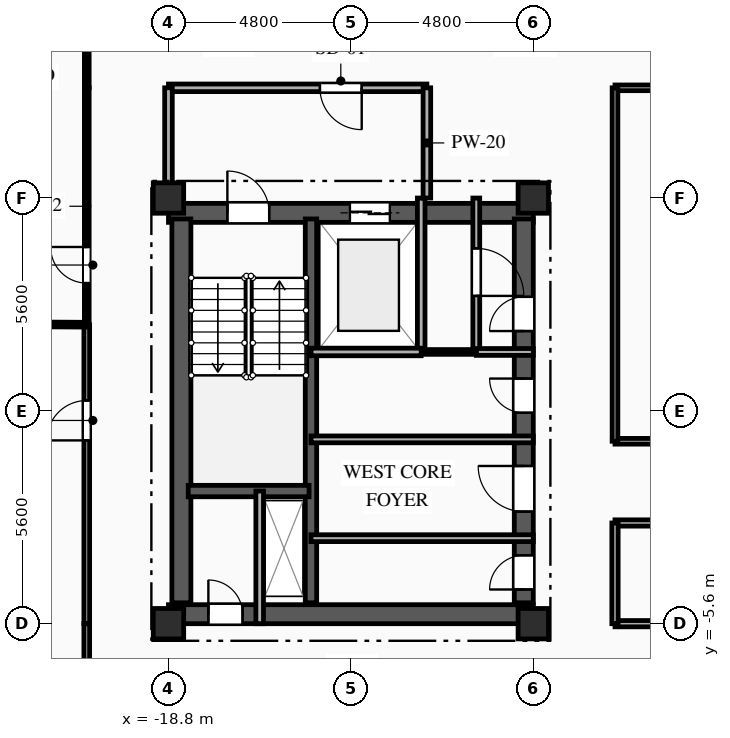
"""IFC4 building model, lengths in metres.
Left out: names, types, materials, properties, quantities, classifications, styles, units other than length and angle.
Written with IfcOpenShell. Run it as: python <this file> out.ifc"""

import sys

from ifc_helpers import new_model, si_unit, direction, frame, frame_2d, origin, origin_2d, place, context, subcontext, project, spatial, rectangle, extrude, element, fill, save


model = new_model("IFC4")
c1 = context("Model", 3, precision=1e-05, world=origin(), true_north=direction((0.0, 1.0)))
c2 = subcontext(c1, "Body", "Model", "MODEL_VIEW")
j1 = project(units=[si_unit("LENGTHUNIT", "METRE"), si_unit("PLANEANGLEUNIT", "RADIAN")], contexts=[c1])
p1 = place(None, origin())
s1 = spatial("IfcSite", under=j1, at=p1, CompositionType="ELEMENT")
p2 = place(p1, origin())
s2 = spatial("IfcBuilding", under=s1, at=p2, CompositionType="ELEMENT")
p3 = place(p2, frame((0.0, 0.0, 196.4)))
s3 = spatial("IfcBuildingStorey", under=s2, at=p3, CompositionType="ELEMENT", Elevation=196.4)
for number, where, z_axis, x_axis in (
    (1, (-18.8, -5.6, 0.0), (0.0, 0.0, 1.0), (1.0, 0.0, 0.0)),
    (2, (-18.8, 5.6, 0.0), (0.0, 0.0, 1.0), (1.0, 0.0, 0.0)),
    (3, (-9.2, -5.6, 0.0), (0.0, 0.0, 1.0), (1.0, 0.0, 0.0)),
    (4, (-9.2, 5.6, 0.0), (0.0, 0.0, 1.0), (1.0, 0.0, 0.0)),
):
    element("IfcColumn", number, at=place(p3, frame(where, z_axis=z_axis, x_axis=x_axis)), inside=s3, PredefinedType="COLUMN", context=c2, shape_type="SweptSolid", body=[
        extrude(rectangle(XDim=0.8, YDim=0.8, at=origin_2d()), origin(), (0.0, 0.0, 1.0), 3.35),
    ])
p4 = place(p3, frame((-18.8, 5.21, 0.0), z_axis=(0.0, 0.0, 1.0), x_axis=(1.0, 0.0, 0.0)))
e5 = element("IfcWall", 5, at=p4, inside=s3, PredefinedType="SHEAR", context=c2, shape_type="SweptSolid", body=[
    extrude(rectangle(XDim=9.6, YDim=0.5, at=frame_2d((4.8, 0.0))), origin(), (0.0, 0.0, 1.0), 3.04),
])
p5 = place(p4, frame((1.55, 0.0, 0.0)))
e6 = element("IfcOpeningElement", 6, at=p5, cuts=e5, PredefinedType="OPENING", context=c2, shape_type="SweptSolid", body=[
    extrude(rectangle(XDim=1.1, YDim=2.15, at=frame_2d((0.55, 1.075))), frame((0.0, 0.26, 0.0), z_axis=(0.0, -1.0, 0.0), x_axis=(1.0, 0.0, 0.0)), (0.0, 0.0, 1.0), 0.52),
])
p6 = place(p4, frame((4.775, 0.0, 0.0)))
e7 = element("IfcOpeningElement", 7, at=p6, cuts=e5, PredefinedType="OPENING", context=c2, shape_type="SweptSolid", body=[
    extrude(rectangle(XDim=1.05, YDim=2.1, at=frame_2d((0.525, 1.05))), frame((0.0, 0.26, 0.0), z_axis=(0.0, -1.0, 0.0), x_axis=(1.0, 0.0, 0.0)), (0.0, 0.0, 1.0), 0.52),
])
p7 = place(p3, frame((-18.8, -5.35, 0.0), z_axis=(0.0, 0.0, 1.0), x_axis=(1.0, 0.0, 0.0)))
e8 = element("IfcWall", 8, at=p7, inside=s3, PredefinedType="SHEAR", context=c2, shape_type="SweptSolid", body=[
    extrude(rectangle(XDim=9.6, YDim=0.5, at=frame_2d((4.8, 0.0))), origin(), (0.0, 0.0, 1.0), 3.04),
])
p8 = place(p7, frame((1.05, 0.0, 0.0)))
e9 = element("IfcOpeningElement", 9, at=p8, cuts=e8, PredefinedType="OPENING", context=c2, shape_type="SweptSolid", body=[
    extrude(rectangle(XDim=0.9, YDim=2.1, at=frame_2d((0.45, 1.05))), frame((0.0, 0.26, 0.0), z_axis=(0.0, -1.0, 0.0), x_axis=(1.0, 0.0, 0.0)), (0.0, 0.0, 1.0), 0.52),
])
p9 = place(p3, frame((-18.46, -5.05, 0.0), z_axis=(0.0, 0.0, 1.0), x_axis=(0.0, 1.0, 0.0)))
e10 = element("IfcWall", 10, at=p9, inside=s3, PredefinedType="SHEAR", context=c2, shape_type="SweptSolid", body=[
    extrude(rectangle(XDim=10.1, YDim=0.5, at=frame_2d((5.05, 0.0))), origin(), (0.0, 0.0, 1.0), 3.04),
])
p10 = place(p3, frame((-9.45, -5.05, 0.0), z_axis=(0.0, 0.0, 1.0), x_axis=(0.0, 1.0, 0.0)))
e11 = element("IfcWall", 11, at=p10, inside=s3, PredefinedType="SHEAR", context=c2, shape_type="SweptSolid", body=[
    extrude(rectangle(XDim=10.1, YDim=0.5, at=frame_2d((5.05, 0.0))), origin(), (0.0, 0.0, 1.0), 3.04),
])
p11 = place(p10, frame((7.15, 0.0, 0.0)))
e12 = element("IfcOpeningElement", 12, at=p11, cuts=e11, PredefinedType="OPENING", context=c2, shape_type="SweptSolid", body=[
    extrude(rectangle(XDim=0.9, YDim=2.1, at=frame_2d((0.45, 1.05))), frame((0.0, 0.26, 0.0), z_axis=(0.0, -1.0, 0.0), x_axis=(1.0, 0.0, 0.0)), (0.0, 0.0, 1.0), 0.52),
])
p12 = place(p10, frame((2.4, 0.0, 0.0)))
e13 = element("IfcOpeningElement", 13, at=p12, cuts=e11, PredefinedType="OPENING", context=c2, shape_type="SweptSolid", body=[
    extrude(rectangle(XDim=1.2, YDim=2.15, at=frame_2d((0.6, 1.075))), frame((0.0, 0.26, 0.0), z_axis=(0.0, -1.0, 0.0), x_axis=(1.0, 0.0, 0.0)), (0.0, 0.0, 1.0), 0.52),
])
p13 = place(p10, frame((0.35, 0.0, 0.0)))
e14 = element("IfcOpeningElement", 14, at=p13, cuts=e11, PredefinedType="OPENING", context=c2, shape_type="SweptSolid", body=[
    extrude(rectangle(XDim=0.9, YDim=2.1, at=frame_2d((0.45, 1.05))), frame((0.0, 0.26, 0.0), z_axis=(0.0, -1.0, 0.0), x_axis=(1.0, 0.0, 0.0)), (0.0, 0.0, 1.0), 0.52),
])
p14 = place(p10, frame((5.0, 0.0, 0.0)))
e15 = element("IfcOpeningElement", 15, at=p14, cuts=e11, PredefinedType="OPENING", context=c2, shape_type="SweptSolid", body=[
    extrude(rectangle(XDim=0.9, YDim=2.1, at=frame_2d((0.45, 1.05))), frame((0.0, 0.26, 0.0), z_axis=(0.0, -1.0, 0.0), x_axis=(1.0, 0.0, 0.0)), (0.0, 0.0, 1.0), 0.52),
])
p15 = place(p3, frame((-15.05, -5.05, 0.0), z_axis=(0.0, 0.0, 1.0), x_axis=(0.0, 1.0, 0.0)))
e16 = element("IfcWall", 16, at=p15, inside=s3, PredefinedType="SHEAR", context=c2, shape_type="SweptSolid", body=[
    extrude(rectangle(XDim=10.1, YDim=0.3, at=frame_2d((5.05, 0.0))), origin(), (0.0, 0.0, 1.0), 3.04),
])
p16 = place(p3, frame((-18.28, -2.11, 0.0), z_axis=(0.0, 0.0, 1.0), x_axis=(1.0, 0.0, 0.0)))
e17 = element("IfcWall", 17, at=p16, inside=s3, PredefinedType="SHEAR", context=c2, shape_type="SweptSolid", body=[
    extrude(rectangle(XDim=3.18, YDim=0.3, at=frame_2d((1.59, 0.0))), origin(), (0.0, 0.0, 1.0), 3.04),
])
p17 = place(p3, frame((-16.4, -5.6, 0.0), z_axis=(0.0, 0.0, 1.0), x_axis=(0.0, 1.0, 0.0)))
e18 = element("IfcWall", 18, at=p17, inside=s3, PredefinedType="PARTITIONING", context=c2, shape_type="SweptSolid", body=[
    extrude(rectangle(XDim=3.49, YDim=0.2, at=frame_2d((1.745, 0.0))), origin(), (0.0, 0.0, 1.0), 3.04),
])
p18 = place(p3, frame((-12.15, 1.55, 0.0), z_axis=(0.0, 0.0, 1.0), x_axis=(0.0, 1.0, 0.0)))
e19 = element("IfcWall", 19, at=p18, inside=s3, PredefinedType="PARTITIONING", context=c2, shape_type="SweptSolid", body=[
    extrude(rectangle(XDim=4.05, YDim=0.2, at=frame_2d((2.025, 0.0))), origin(), (0.0, 0.0, 1.0), 3.04),
])
p19 = place(p3, frame((-12.0, 8.5, 0.0), z_axis=(0.0, 0.0, 1.0), x_axis=(-1.0, 0.0, 0.0)))
e20 = element("IfcWall", 20, at=p19, inside=s3, PredefinedType="PARTITIONING", context=c2, shape_type="SweptSolid", body=[
    extrude(rectangle(XDim=6.8, YDim=0.2, at=frame_2d((3.4, 0.0))), origin(), (0.0, 0.0, 1.0), 3.04),
])
p20 = place(p19, frame((1.715, 0.0, 0.0)))
e21 = element("IfcOpeningElement", 21, at=p20, cuts=e20, PredefinedType="OPENING", context=c2, shape_type="SweptSolid", body=[
    extrude(rectangle(XDim=1.1, YDim=2.15, at=frame_2d((0.55, 1.075))), frame((0.0, 0.11, 0.0), z_axis=(0.0, -1.0, 0.0), x_axis=(1.0, 0.0, 0.0)), (0.0, 0.0, 1.0), 0.22),
])
p21 = place(p3, frame((-18.8, 8.5, 0.0), z_axis=(0.0, 0.0, 1.0), x_axis=(0.0, -1.0, 0.0)))
e22 = element("IfcWall", 22, at=p21, inside=s3, PredefinedType="PARTITIONING", context=c2, shape_type="SweptSolid", body=[
    extrude(rectangle(XDim=2.9, YDim=0.2, at=frame_2d((1.45, 0.0))), origin(), (0.0, 0.0, 1.0), 2.665),
])
p22 = place(p3, frame((-12.0, 5.6, 0.0), z_axis=(0.0, 0.0, 1.0), x_axis=(0.0, 1.0, 0.0)))
e23 = element("IfcWall", 23, at=p22, inside=s3, PredefinedType="PARTITIONING", context=c2, shape_type="SweptSolid", body=[
    extrude(rectangle(XDim=2.9, YDim=0.2, at=frame_2d((1.45, 0.0))), origin(), (0.0, 0.0, 1.0), 3.04),
])
p23 = place(p3, frame((-10.7, 5.6, 0.0), z_axis=(0.0, 0.0, 1.0), x_axis=(0.0, -1.0, 0.0)))
e24 = element("IfcWall", 24, at=p23, inside=s3, PredefinedType="PARTITIONING", context=c2, shape_type="SweptSolid", body=[
    extrude(rectangle(XDim=4.05, YDim=0.18, at=frame_2d((2.025, 0.0))), origin(), (0.0, 0.0, 1.0), 3.04),
])
p24 = place(p23, frame((1.325, 0.0, 0.0)))
e25 = element("IfcOpeningElement", 25, at=p24, cuts=e24, PredefinedType="OPENING", context=c2, shape_type="SweptSolid", body=[
    extrude(rectangle(XDim=1.25, YDim=2.2, at=frame_2d((0.625, 1.1))), frame((0.0, 0.1, 0.0), z_axis=(0.0, -1.0, 0.0), x_axis=(1.0, 0.0, 0.0)), (0.0, 0.0, 1.0), 0.2),
])
p25 = place(p3, frame((-10.7, 1.55, 0.0), z_axis=(0.0, 0.0, 1.0), x_axis=(1.0, 0.0, 0.0)))
e26 = element("IfcWall", 26, at=p25, inside=s3, PredefinedType="PARTITIONING", context=c2, shape_type="SweptSolid", body=[
    extrude(rectangle(XDim=1.5, YDim=0.18, at=frame_2d((0.75, 0.0))), origin(), (0.0, 0.0, 1.0), 3.04),
])
p26 = place(p3, frame((-12.15, 1.55, 0.0), z_axis=(0.0, 0.0, 1.0), x_axis=(1.0, 0.0, 0.0)))
e27 = element("IfcWall", 27, at=p26, inside=s3, PredefinedType="PARTITIONING", context=c2, shape_type="SweptSolid", body=[
    extrude(rectangle(XDim=1.45, YDim=0.125, at=frame_2d((0.725, 0.0))), origin(), (0.0, 0.0, 1.0), 3.04),
])
p27 = place(p3, frame((-15.05, -3.35, 0.0), z_axis=(0.0, 0.0, 1.0), x_axis=(1.0, 0.0, 0.0)))
e28 = element("IfcWall", 28, at=p27, inside=s3, PredefinedType="PARTITIONING", context=c2, shape_type="SweptSolid", body=[
    extrude(rectangle(XDim=5.85, YDim=0.18, at=frame_2d((2.925, 0.0))), origin(), (0.0, 0.0, 1.0), 2.755),
])
p28 = place(p3, frame((-9.2, -0.75, 0.0), z_axis=(0.0, 0.0, 1.0), x_axis=(-1.0, 0.0, 0.0)))
e29 = element("IfcWall", 29, at=p28, inside=s3, PredefinedType="PARTITIONING", context=c2, shape_type="SweptSolid", body=[
    extrude(rectangle(XDim=5.85, YDim=0.18, at=frame_2d((2.925, 0.0))), origin(), (0.0, 0.0, 1.0), 3.04),
])
p29 = place(p3, frame((-20.95, 8.5, 0.0), z_axis=(0.0, 0.0, 1.0), x_axis=(0.0, 1.0, 0.0)))
e30 = element("IfcWall", 30, at=p29, inside=s3, PredefinedType="PARTITIONING", context=c2, shape_type="SweptSolid", body=[
    extrude(rectangle(XDim=2.15, YDim=0.125, at=frame_2d((1.075, 0.0))), origin(), (0.0, 0.0, 1.0), 3.04),
])
p30 = place(p3, frame((0.0, 8.5, 0.0), z_axis=(0.0, 0.0, 1.0), x_axis=(-1.0, 0.0, 0.0)))
e31 = element("IfcWall", 31, at=p30, inside=s3, PredefinedType="PARTITIONING", context=c2, shape_type="SweptSolid", body=[
    extrude(rectangle(XDim=7.05, YDim=0.15, at=frame_2d((3.525, 0.0))), origin(), (0.0, 0.0, 1.0), 3.04),
])
p31 = place(p3, frame((-20.95, -7.75, 0.0), z_axis=(0.0, 0.0, 1.0), x_axis=(0.0, 1.0, 0.0)))
e32 = element("IfcWall", 32, at=p31, inside=s3, PredefinedType="PARTITIONING", context=c2, shape_type="SweptSolid", body=[
    extrude(rectangle(XDim=2.15, YDim=0.15, at=frame_2d((1.075, 0.0))), origin(), (0.0, 0.0, 1.0), 3.04),
])
p32 = place(p3, frame((-7.05, -5.6, 0.0), z_axis=(0.0, 0.0, 1.0), x_axis=(1.0, 0.0, 0.0)))
e33 = element("IfcWall", 33, at=p32, inside=s3, PredefinedType="PARTITIONING", context=c2, shape_type="SweptSolid", body=[
    extrude(rectangle(XDim=7.05, YDim=0.165, at=frame_2d((3.525, 0.0))), origin(), (0.0, 0.0, 1.0), 2.525),
])
p33 = place(p3, frame((-20.95, -5.6, 0.0), z_axis=(0.0, 0.0, 1.0), x_axis=(0.0, 1.0, 0.0)))
e34 = element("IfcWall", 34, at=p33, inside=s3, PredefinedType="PARTITIONING", context=c2, shape_type="SweptSolid", body=[
    extrude(rectangle(XDim=7.867, YDim=0.15, at=frame_2d((3.934, 0.0))), origin(), (0.0, 0.0, 1.0), 3.04),
])
p34 = place(p33, frame((4.823, 0.0, 0.0)))
e35 = element("IfcOpeningElement", 35, at=p34, cuts=e34, PredefinedType="OPENING", context=c2, shape_type="SweptSolid", body=[
    extrude(rectangle(XDim=1.05, YDim=2.15, at=frame_2d((0.525, 1.075))), frame((0.0, 0.085, 0.0), z_axis=(0.0, -1.0, 0.0), x_axis=(1.0, 0.0, 0.0)), (0.0, 0.0, 1.0), 0.17),
])
p35 = place(p3, frame((-20.95, 2.267, 0.0), z_axis=(0.0, 0.0, 1.0), x_axis=(0.0, 1.0, 0.0)))
e36 = element("IfcWall", 36, at=p35, inside=s3, PredefinedType="PARTITIONING", context=c2, shape_type="SweptSolid", body=[
    extrude(rectangle(XDim=6.233, YDim=0.125, at=frame_2d((3.116, 0.0))), origin(), (0.0, 0.0, 1.0), 3.04),
])
p36 = place(p35, frame((1.095, 0.0, 0.0)))
e37 = element("IfcOpeningElement", 37, at=p36, cuts=e36, PredefinedType="OPENING", context=c2, shape_type="SweptSolid", body=[
    extrude(rectangle(XDim=0.95, YDim=2.1, at=frame_2d((0.475, 1.05))), frame((0.0, 0.073, 0.0), z_axis=(0.0, -1.0, 0.0), x_axis=(1.0, 0.0, 0.0)), (0.0, 0.0, 1.0), 0.145),
])
p37 = place(p3, frame((-7.05, -0.8, 0.0), z_axis=(0.0, 0.0, 1.0), x_axis=(1.0, 0.0, 0.0)))
e38 = element("IfcWall", 38, at=p37, inside=s3, PredefinedType="PARTITIONING", context=c2, shape_type="SweptSolid", body=[
    extrude(rectangle(XDim=14.1, YDim=0.15, at=frame_2d((7.05, 0.0))), origin(), (0.0, 0.0, 1.0), 3.04),
])
p38 = place(p37, frame((6.525, 0.0, 0.0)))
e39 = element("IfcOpeningElement", 39, at=p38, cuts=e38, PredefinedType="OPENING", context=c2, shape_type="SweptSolid", body=[
    extrude(rectangle(XDim=1.05, YDim=2.15, at=frame_2d((0.525, 1.075))), frame((0.0, 0.085, 0.0), z_axis=(0.0, -1.0, 0.0), x_axis=(1.0, 0.0, 0.0)), (0.0, 0.0, 1.0), 0.17),
])
p39 = place(p3, frame((7.05, -2.95, 0.0), z_axis=(0.0, 0.0, 1.0), x_axis=(-1.0, 0.0, 0.0)))
e40 = element("IfcWall", 40, at=p39, inside=s3, PredefinedType="PARTITIONING", context=c2, shape_type="SweptSolid", body=[
    extrude(rectangle(XDim=14.1, YDim=0.165, at=frame_2d((7.05, 0.0))), origin(), (0.0, 0.0, 1.0), 3.04),
])
p40 = place(p39, frame((6.475, 0.0, 0.0)))
e41 = element("IfcOpeningElement", 41, at=p40, cuts=e40, PredefinedType="OPENING", context=c2, shape_type="SweptSolid", body=[
    extrude(rectangle(XDim=1.15, YDim=2.15, at=frame_2d((0.575, 1.075))), frame((0.0, 0.093, 0.0), z_axis=(0.0, -1.0, 0.0), x_axis=(1.0, 0.0, 0.0)), (0.0, 0.0, 1.0), 0.185),
])
p41 = place(p3, frame((-7.05, 8.5, 0.0), z_axis=(0.0, 0.0, 1.0), x_axis=(0.0, -1.0, 0.0)))
e42 = element("IfcWall", 42, at=p41, inside=s3, PredefinedType="PARTITIONING", context=c2, shape_type="SweptSolid", body=[
    extrude(rectangle(XDim=9.3, YDim=0.15, at=frame_2d((4.65, 0.0))), origin(), (0.0, 0.0, 1.0), 3.04),
])
p42 = place(p3, frame((-7.05, -2.95, 0.0), z_axis=(0.0, 0.0, 1.0), x_axis=(0.0, -1.0, 0.0)))
e43 = element("IfcWall", 43, at=p42, inside=s3, PredefinedType="PARTITIONING", context=c2, shape_type="SweptSolid", body=[
    extrude(rectangle(XDim=2.65, YDim=0.165, at=frame_2d((1.325, 0.0))), origin(), (0.0, 0.0, 1.0), 3.04),
])
p43 = place(p3, frame((-28.021, 2.311, 0.0), z_axis=(0.0, 0.0, 1.0), x_axis=(0.99998090118, -0.006180394355, 0.0)))
e44 = element("IfcWall", 44, at=p43, inside=s3, PredefinedType="PARTITIONING", context=c2, shape_type="SweptSolid", body=[
    extrude(rectangle(XDim=7.071, YDim=0.125, at=frame_2d((3.536, 0.0))), origin(), (0.0, 0.0, 1.0), 3.04),
])
p44 = place(p3, frame((-15.05, 1.55, 0.0), z_axis=(0.0, 0.0, 1.0), x_axis=(1.0, 0.0, 0.0)))
e45 = element("IfcWall", 45, at=p44, inside=s3, PredefinedType="PARTITIONING", context=c2, shape_type="SweptSolid", body=[
    extrude(rectangle(XDim=2.9, YDim=0.2, at=frame_2d((1.45, 0.0))), origin(), (0.0, 0.0, 1.0), 3.04),
])
p45 = place(p5, origin())
e46 = element("IfcDoor", 46, at=p45, inside=s3, OperationType="SINGLE_SWING_LEFT", PredefinedType="DOOR", context=c2, shape_type="SweptSolid", body=[
    extrude(rectangle(XDim=1.1, YDim=2.15, at=frame_2d((0.55, 1.075))), frame((0.0, 0.025, 0.0), z_axis=(0.0, -1.0, 0.0), x_axis=(1.0, 0.0, 0.0)), (0.0, 0.0, 1.0), 0.05),
])
fill(e6, e46)
p46 = place(p6, origin())
e47 = element("IfcDoor", 47, at=p46, inside=s3, OperationType="DOUBLE_DOOR_SLIDING", PredefinedType="DOOR", context=c2, shape_type="SweptSolid", body=[
    extrude(rectangle(XDim=1.05, YDim=2.1, at=frame_2d((0.525, 1.05))), frame((0.0, 0.025, 0.0), z_axis=(0.0, -1.0, 0.0), x_axis=(1.0, 0.0, 0.0)), (0.0, 0.0, 1.0), 0.05),
])
fill(e7, e47)
p47 = place(p8, origin())
e48 = element("IfcDoor", 48, at=p47, inside=s3, OperationType="SINGLE_SWING_LEFT", PredefinedType="DOOR", context=c2, shape_type="SweptSolid", body=[
    extrude(rectangle(XDim=0.9, YDim=2.1, at=frame_2d((0.45, 1.05))), frame((0.0, 0.025, 0.0), z_axis=(0.0, -1.0, 0.0), x_axis=(1.0, 0.0, 0.0)), (0.0, 0.0, 1.0), 0.05),
])
fill(e9, e48)
p48 = place(p20, origin())
e49 = element("IfcDoor", 49, at=p48, inside=s3, OperationType="SINGLE_SWING_LEFT", PredefinedType="DOOR", context=c2, shape_type="SweptSolid", body=[
    extrude(rectangle(XDim=1.1, YDim=2.15, at=frame_2d((0.55, 1.075))), frame((0.0, 0.025, 0.0), z_axis=(0.0, -1.0, 0.0), x_axis=(1.0, 0.0, 0.0)), (0.0, 0.0, 1.0), 0.05),
])
fill(e21, e49)
p49 = place(p24, origin())
e50 = element("IfcDoor", 50, at=p49, inside=s3, OperationType="SINGLE_SWING_RIGHT", PredefinedType="DOOR", context=c2, shape_type="SweptSolid", body=[
    extrude(rectangle(XDim=1.25, YDim=2.2, at=frame_2d((0.625, 1.1))), frame((0.0, 0.025, 0.0), z_axis=(0.0, -1.0, 0.0), x_axis=(1.0, 0.0, 0.0)), (0.0, 0.0, 1.0), 0.05),
])
fill(e25, e50)
p50 = place(p11, origin())
e51 = element("IfcDoor", 51, at=p50, inside=s3, OperationType="SINGLE_SWING_LEFT", PredefinedType="DOOR", context=c2, shape_type="SweptSolid", body=[
    extrude(rectangle(XDim=0.9, YDim=2.1, at=frame_2d((0.45, 1.05))), frame((0.0, 0.025, 0.0), z_axis=(0.0, -1.0, 0.0), x_axis=(1.0, 0.0, 0.0)), (0.0, 0.0, 1.0), 0.05),
])
fill(e12, e51)
p51 = place(p12, origin())
e52 = element("IfcDoor", 52, at=p51, inside=s3, OperationType="SINGLE_SWING_RIGHT", PredefinedType="DOOR", context=c2, shape_type="SweptSolid", body=[
    extrude(rectangle(XDim=1.2, YDim=2.15, at=frame_2d((0.6, 1.075))), frame((0.0, 0.025, 0.0), z_axis=(0.0, -1.0, 0.0), x_axis=(1.0, 0.0, 0.0)), (0.0, 0.0, 1.0), 0.05),
])
fill(e13, e52)
p52 = place(p13, origin())
e53 = element("IfcDoor", 53, at=p52, inside=s3, OperationType="SINGLE_SWING_LEFT", PredefinedType="DOOR", context=c2, shape_type="SweptSolid", body=[
    extrude(rectangle(XDim=0.9, YDim=2.1, at=frame_2d((0.45, 1.05))), frame((0.0, 0.025, 0.0), z_axis=(0.0, -1.0, 0.0), x_axis=(1.0, 0.0, 0.0)), (0.0, 0.0, 1.0), 0.05),
])
fill(e14, e53)
p53 = place(p14, origin())
e54 = element("IfcDoor", 54, at=p53, inside=s3, OperationType="SINGLE_SWING_RIGHT", PredefinedType="DOOR", context=c2, shape_type="SweptSolid", body=[
    extrude(rectangle(XDim=0.9, YDim=2.1, at=frame_2d((0.45, 1.05))), frame((0.0, 0.025, 0.0), z_axis=(0.0, -1.0, 0.0), x_axis=(1.0, 0.0, 0.0)), (0.0, 0.0, 1.0), 0.05),
])
fill(e15, e54)
p54 = place(p34, origin())
e55 = element("IfcDoor", 55, at=p54, inside=s3, OperationType="SINGLE_SWING_LEFT", PredefinedType="DOOR", context=c2, shape_type="SweptSolid", body=[
    extrude(rectangle(XDim=1.05, YDim=2.15, at=frame_2d((0.525, 1.075))), frame((0.0, 0.025, 0.0), z_axis=(0.0, -1.0, 0.0), x_axis=(1.0, 0.0, 0.0)), (0.0, 0.0, 1.0), 0.05),
])
fill(e35, e55)
p55 = place(p36, origin())
e56 = element("IfcDoor", 56, at=p55, inside=s3, OperationType="SINGLE_SWING_RIGHT", PredefinedType="DOOR", context=c2, shape_type="SweptSolid", body=[
    extrude(rectangle(XDim=0.95, YDim=2.1, at=frame_2d((0.475, 1.05))), frame((0.0, 0.025, 0.0), z_axis=(0.0, -1.0, 0.0), x_axis=(1.0, 0.0, 0.0)), (0.0, 0.0, 1.0), 0.05),
])
fill(e37, e56)
save(model, sys.argv[1])
